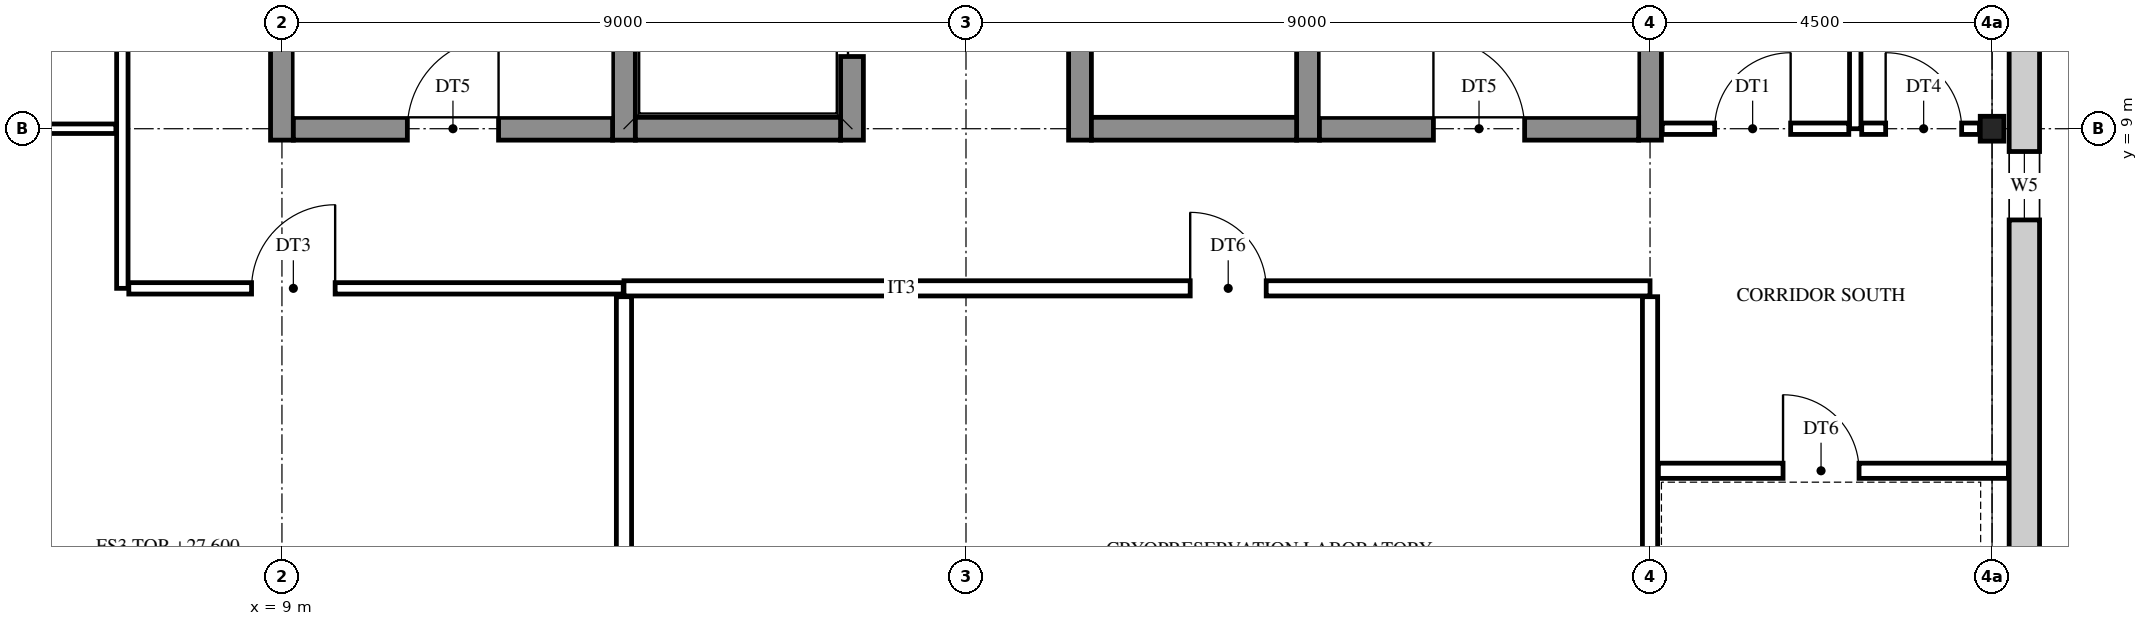
"""IFC4 building model, lengths in metres.
Left out: names, types, materials, properties, quantities, classifications, styles, units other than length and angle.
Written with IfcOpenShell. Run it as: python <this file> out.ifc"""

import sys

from ifc_helpers import new_model, si_unit, direction, frame, frame_2d, origin, origin_2d, place, context, subcontext, project, spatial, rectangle, i_section, extrude, element, fill, save


model = new_model("IFC4")
c1 = context("Model", 3, precision=1e-05, world=origin(), true_north=direction((0.0, 1.0)))
c2 = subcontext(c1, "Body", "Model", "MODEL_VIEW")
j1 = project(units=[si_unit("LENGTHUNIT", "METRE"), si_unit("PLANEANGLEUNIT", "RADIAN")], contexts=[c1])
p1 = place(None, origin())
s1 = spatial("IfcSite", under=j1, at=p1, CompositionType="ELEMENT")
p2 = place(p1, origin())
s2 = spatial("IfcBuilding", under=s1, at=p2, CompositionType="ELEMENT")
p3 = place(p2, frame((0.0, 0.0, 27.6)))
s3 = spatial("IfcBuildingStorey", under=s2, at=p3, CompositionType="ELEMENT", Elevation=27.6)
p4 = place(p3, frame((31.5, 9.0, 0.0), z_axis=(0.0, 0.0, 1.0), x_axis=(1.0, 0.0, 0.0)))
e1 = element("IfcColumn", 1, at=p4, inside=s3, PredefinedType="COLUMN", context=c2, shape_type="SweptSolid", body=[
    extrude(i_section(OverallWidth=0.311, OverallDepth=0.327, WebThickness=0.016, FlangeThickness=0.025, FilletRadius=0.017, at=origin_2d()), origin(), (0.0, 0.0, 1.0), 4.2),
])
for number, where, z_axis, x_axis in (
    (2, (9.0, 8.85, 0.0), (0.0, 0.0, 1.0), (0.0, 1.0, 0.0)),
    (3, (13.5, 8.85, 0.0), (0.0, 0.0, 1.0), (0.0, 1.0, 0.0)),
):
    element("IfcWall", number, at=place(p3, frame(where, z_axis=z_axis, x_axis=x_axis)), inside=s3, PredefinedType="SHEAR", context=c2, shape_type="SweptSolid", body=[
        extrude(rectangle(XDim=9.3, YDim=0.3, at=frame_2d((4.65, 0.0))), origin(), (0.0, 0.0, 1.0), 4.2),
    ])
p5 = place(p3, frame((16.5, 8.85, 0.0), z_axis=(0.0, 0.0, 1.0), x_axis=(0.0, 1.0, 0.0)))
e4 = element("IfcWall", 4, at=p5, inside=s3, PredefinedType="SHEAR", context=c2, shape_type="SweptSolid", body=[
    extrude(rectangle(XDim=9.3, YDim=0.3, at=frame_2d((4.65, 0.0))), origin(), (0.0, 0.0, 1.0), 4.2),
])
p6 = place(p5, frame((1.1, 0.0, 0.0)))
e5 = element("IfcOpeningElement", 5, at=p6, cuts=e4, PredefinedType="OPENING", context=c2, shape_type="SweptSolid", body=[
    extrude(rectangle(XDim=1.1, YDim=2.1, at=frame_2d((0.55, 1.05))), frame((0.0, 0.16, 0.0), z_axis=(0.0, -1.0, 0.0), x_axis=(1.0, 0.0, 0.0)), (0.0, 0.0, 1.0), 0.32),
])
p7 = place(p5, frame((4.1, 0.0, 0.0)))
e6 = element("IfcOpeningElement", 6, at=p7, cuts=e4, PredefinedType="OPENING", context=c2, shape_type="SweptSolid", body=[
    extrude(rectangle(XDim=1.1, YDim=2.1, at=frame_2d((0.55, 1.05))), frame((0.0, 0.16, 0.0), z_axis=(0.0, -1.0, 0.0), x_axis=(1.0, 0.0, 0.0)), (0.0, 0.0, 1.0), 0.32),
])
p8 = place(p3, frame((19.5, 8.85, 0.0), z_axis=(0.0, 0.0, 1.0), x_axis=(0.0, 1.0, 0.0)))
e7 = element("IfcWall", 7, at=p8, inside=s3, PredefinedType="SHEAR", context=c2, shape_type="SweptSolid", body=[
    extrude(rectangle(XDim=9.3, YDim=0.3, at=frame_2d((4.65, 0.0))), origin(), (0.0, 0.0, 1.0), 4.2),
])
p9 = place(p8, frame((3.95, 0.0, 0.0)))
e8 = element("IfcOpeningElement", 8, at=p9, cuts=e7, PredefinedType="OPENING", context=c2, shape_type="SweptSolid", body=[
    extrude(rectangle(XDim=1.4, YDim=2.1, at=frame_2d((0.7, 1.05))), frame((0.0, 0.16, 0.0), z_axis=(0.0, -1.0, 0.0), x_axis=(1.0, 0.0, 0.0)), (0.0, 0.0, 1.0), 0.32),
])
p10 = place(p8, frame((7.1, 0.0, 0.0)))
e9 = element("IfcOpeningElement", 9, at=p10, cuts=e7, PredefinedType="OPENING", context=c2, shape_type="SweptSolid", body=[
    extrude(rectangle(XDim=1.1, YDim=2.1, at=frame_2d((0.55, 1.05))), frame((0.0, 0.16, 0.0), z_axis=(0.0, -1.0, 0.0), x_axis=(1.0, 0.0, 0.0)), (0.0, 0.0, 1.0), 0.32),
])
for number, where, z_axis, x_axis in (
    (10, (22.5, 8.85, 0.0), (0.0, 0.0, 1.0), (0.0, 1.0, 0.0)),
    (11, (27.0, 8.85, 0.0), (0.0, 0.0, 1.0), (0.0, 1.0, 0.0)),
):
    element("IfcWall", number, at=place(p3, frame(where, z_axis=z_axis, x_axis=x_axis)), inside=s3, PredefinedType="SHEAR", context=c2, shape_type="SweptSolid", body=[
        extrude(rectangle(XDim=9.3, YDim=0.3, at=frame_2d((4.65, 0.0))), origin(), (0.0, 0.0, 1.0), 4.2),
    ])
p11 = place(p3, frame((9.15, 9.0, 0.0), z_axis=(0.0, 0.0, 1.0), x_axis=(1.0, 0.0, 0.0)))
e12 = element("IfcWall", 12, at=p11, inside=s3, PredefinedType="SHEAR", context=c2, shape_type="SweptSolid", body=[
    extrude(rectangle(XDim=4.2, YDim=0.3, at=frame_2d((2.1, 0.0))), origin(), (0.0, 0.0, 1.0), 4.2),
])
p12 = place(p11, frame((1.5, 0.0, 0.0)))
e13 = element("IfcOpeningElement", 13, at=p12, cuts=e12, PredefinedType="OPENING", context=c2, shape_type="SweptSolid", body=[
    extrude(rectangle(XDim=1.2, YDim=2.1, at=frame_2d((0.6, 1.05))), frame((0.0, 0.16, 0.0), z_axis=(0.0, -1.0, 0.0), x_axis=(1.0, 0.0, 0.0)), (0.0, 0.0, 1.0), 0.32),
])
for number, where, z_axis, x_axis in (
    (14, (13.65, 9.0, 0.0), (0.0, 0.0, 1.0), (1.0, 0.0, 0.0)),
    (15, (19.65, 9.0, 0.0), (0.0, 0.0, 1.0), (1.0, 0.0, 0.0)),
):
    element("IfcWall", number, at=place(p3, frame(where, z_axis=z_axis, x_axis=x_axis)), inside=s3, PredefinedType="SHEAR", context=c2, shape_type="SweptSolid", body=[
        extrude(rectangle(XDim=2.7, YDim=0.3, at=frame_2d((1.35, 0.0))), origin(), (0.0, 0.0, 1.0), 4.2),
    ])
p13 = place(p3, frame((22.65, 9.0, 0.0), z_axis=(0.0, 0.0, 1.0), x_axis=(1.0, 0.0, 0.0)))
e16 = element("IfcWall", 16, at=p13, inside=s3, PredefinedType="SHEAR", context=c2, shape_type="SweptSolid", body=[
    extrude(rectangle(XDim=4.2, YDim=0.3, at=frame_2d((2.1, 0.0))), origin(), (0.0, 0.0, 1.0), 4.2),
])
p14 = place(p13, frame((1.5, 0.0, 0.0)))
e17 = element("IfcOpeningElement", 17, at=p14, cuts=e16, PredefinedType="OPENING", context=c2, shape_type="SweptSolid", body=[
    extrude(rectangle(XDim=1.2, YDim=2.1, at=frame_2d((0.6, 1.05))), frame((0.0, 0.16, 0.0), z_axis=(0.0, -1.0, 0.0), x_axis=(1.0, 0.0, 0.0)), (0.0, 0.0, 1.0), 0.32),
])
p15 = place(p3, frame((31.925, 27.225, 0.0), z_axis=(0.0, 0.0, 1.0), x_axis=(0.0, -1.0, 0.0)))
e18 = element("IfcWall", 18, at=p15, inside=s3, PredefinedType="STANDARD", context=c2, shape_type="SweptSolid", body=[
    extrude(rectangle(XDim=27.45, YDim=0.4, at=frame_2d((13.725, 0.0))), origin(), (0.0, 0.0, 1.0), 4.2),
])
p16 = place(p15, frame((26.025, 0.0, 0.9)))
e19 = element("IfcOpeningElement", 19, at=p16, cuts=e18, PredefinedType="OPENING", context=c2, shape_type="SweptSolid", body=[
    extrude(rectangle(XDim=0.9, YDim=2.0, at=frame_2d((0.45, 1.0))), frame((0.0, 0.21, 0.0), z_axis=(0.0, -1.0, 0.0), x_axis=(1.0, 0.0, 0.0)), (0.0, 0.0, 1.0), 0.42),
])
p17 = place(p15, frame((18.525, 0.0, 0.9)))
e20 = element("IfcOpeningElement", 20, at=p17, cuts=e18, PredefinedType="OPENING", context=c2, shape_type="SweptSolid", body=[
    extrude(rectangle(XDim=0.9, YDim=2.0, at=frame_2d((0.45, 1.0))), frame((0.0, 0.21, 0.0), z_axis=(0.0, -1.0, 0.0), x_axis=(1.0, 0.0, 0.0)), (0.0, 0.0, 1.0), 0.42),
])
p18 = place(p15, frame((15.675, 0.0, 1.6)))
e21 = element("IfcOpeningElement", 21, at=p18, cuts=e18, PredefinedType="OPENING", context=c2, shape_type="SweptSolid", body=[
    extrude(rectangle(XDim=0.6, YDim=0.9, at=frame_2d((0.3, 0.45))), frame((0.0, 0.21, 0.0), z_axis=(0.0, -1.0, 0.0), x_axis=(1.0, 0.0, 0.0)), (0.0, 0.0, 1.0), 0.42),
])
p19 = place(p15, frame((11.175, 0.0, 1.6)))
e22 = element("IfcOpeningElement", 22, at=p19, cuts=e18, PredefinedType="OPENING", context=c2, shape_type="SweptSolid", body=[
    extrude(rectangle(XDim=0.6, YDim=0.9, at=frame_2d((0.3, 0.45))), frame((0.0, 0.21, 0.0), z_axis=(0.0, -1.0, 0.0), x_axis=(1.0, 0.0, 0.0)), (0.0, 0.0, 1.0), 0.42),
])
p20 = place(p15, frame((8.025, 0.0, 0.9)))
e23 = element("IfcOpeningElement", 23, at=p20, cuts=e18, PredefinedType="OPENING", context=c2, shape_type="SweptSolid", body=[
    extrude(rectangle(XDim=0.9, YDim=2.0, at=frame_2d((0.45, 1.0))), frame((0.0, 0.21, 0.0), z_axis=(0.0, -1.0, 0.0), x_axis=(1.0, 0.0, 0.0)), (0.0, 0.0, 1.0), 0.42),
])
p21 = place(p15, frame((0.525, 0.0, 0.9)))
e24 = element("IfcOpeningElement", 24, at=p21, cuts=e18, PredefinedType="OPENING", context=c2, shape_type="SweptSolid", body=[
    extrude(rectangle(XDim=0.9, YDim=2.0, at=frame_2d((0.45, 1.0))), frame((0.0, 0.21, 0.0), z_axis=(0.0, -1.0, 0.0), x_axis=(1.0, 0.0, 0.0)), (0.0, 0.0, 1.0), 0.42),
])
p22 = place(p3, frame((6.9, 6.9, 0.0), z_axis=(0.0, 0.0, 1.0), x_axis=(0.0, 1.0, 0.0)))
e25 = element("IfcWall", 25, at=p22, inside=s3, PredefinedType="PARTITIONING", context=c2, shape_type="SweptSolid", body=[
    extrude(rectangle(XDim=13.115, YDim=0.15, at=frame_2d((6.558, 0.0))), origin(), (0.0, 0.0, 1.0), 3.537),
])
p23 = place(p22, frame((11.6, 0.0, 0.0)))
e26 = element("IfcOpeningElement", 26, at=p23, cuts=e25, PredefinedType="OPENING", context=c2, shape_type="SweptSolid", body=[
    extrude(rectangle(XDim=1.1, YDim=2.1, at=frame_2d((0.55, 1.05))), frame((0.0, 0.085, 0.0), z_axis=(0.0, -1.0, 0.0), x_axis=(1.0, 0.0, 0.0)), (0.0, 0.0, 1.0), 0.17),
])
p24 = place(p22, frame((6.05, 0.0, 0.0)))
e27 = element("IfcOpeningElement", 27, at=p24, cuts=e25, PredefinedType="OPENING", context=c2, shape_type="SweptSolid", body=[
    extrude(rectangle(XDim=1.1, YDim=2.1, at=frame_2d((0.55, 1.05))), frame((0.0, 0.085, 0.0), z_axis=(0.0, -1.0, 0.0), x_axis=(1.0, 0.0, 0.0)), (0.0, 0.0, 1.0), 0.17),
])
p25 = place(p3, frame((13.5, -0.226, 0.0), z_axis=(0.0, 0.0, 1.0), x_axis=(0.0, 1.0, 0.0)))
e28 = element("IfcWall", 28, at=p25, inside=s3, PredefinedType="PARTITIONING", context=c2, shape_type="SweptSolid", body=[
    extrude(rectangle(XDim=7.016, YDim=0.2, at=frame_2d((3.508, 0.0))), origin(), (0.0, 0.0, 1.0), 3.537),
])
p26 = place(p3, frame((27.0, 0.174, 0.0), z_axis=(0.0, 0.0, 1.0), x_axis=(0.0, 1.0, 0.0)))
e29 = element("IfcWall", 29, at=p26, inside=s3, PredefinedType="PARTITIONING", context=c2, shape_type="SweptSolid", body=[
    extrude(rectangle(XDim=6.616, YDim=0.2, at=frame_2d((3.308, 0.0))), origin(), (0.0, 0.0, 1.0), 3.537),
])
p27 = place(p3, frame((29.7, 9.0, 0.0), z_axis=(0.0, 0.0, 1.0), x_axis=(0.0, 1.0, 0.0)))
e30 = element("IfcWall", 30, at=p27, inside=s3, PredefinedType="PARTITIONING", context=c2, shape_type="SweptSolid", body=[
    extrude(rectangle(XDim=6.3, YDim=0.15, at=frame_2d((3.15, 0.0))), origin(), (0.0, 0.0, 1.0), 3.537),
])
p28 = place(p27, frame((4.0, 0.0, 0.0)))
e31 = element("IfcOpeningElement", 31, at=p28, cuts=e30, PredefinedType="OPENING", context=c2, shape_type="SweptSolid", body=[
    extrude(rectangle(XDim=1.0, YDim=2.1, at=frame_2d((0.5, 1.05))), frame((0.0, 0.085, 0.0), z_axis=(0.0, -1.0, 0.0), x_axis=(1.0, 0.0, 0.0)), (0.0, 0.0, 1.0), 0.17),
])
p29 = place(p3, frame((27.11, 4.5, 0.0), z_axis=(0.0, 0.0, 1.0), x_axis=(1.0, 0.0, 0.0)))
e32 = element("IfcWall", 32, at=p29, inside=s3, PredefinedType="PARTITIONING", context=c2, shape_type="SweptSolid", body=[
    extrude(rectangle(XDim=4.605, YDim=0.2, at=frame_2d((2.302, 0.0))), origin(), (0.0, 0.0, 1.0), 3.537),
])
p30 = place(p29, frame((1.64, 0.0, 0.0)))
e33 = element("IfcOpeningElement", 33, at=p30, cuts=e32, PredefinedType="OPENING", context=c2, shape_type="SweptSolid", body=[
    extrude(rectangle(XDim=1.0, YDim=2.1, at=frame_2d((0.5, 1.05))), frame((0.0, 0.11, 0.0), z_axis=(0.0, -1.0, 0.0), x_axis=(1.0, 0.0, 0.0)), (0.0, 0.0, 1.0), 0.22),
])
p31 = place(p3, frame((6.985, 6.9, 0.0), z_axis=(0.0, 0.0, 1.0), x_axis=(1.0, 0.0, 0.0)))
e34 = element("IfcWall", 34, at=p31, inside=s3, PredefinedType="PARTITIONING", context=c2, shape_type="SweptSolid", body=[
    extrude(rectangle(XDim=6.505, YDim=0.15, at=frame_2d((3.252, 0.0))), origin(), (0.0, 0.0, 1.0), 3.537),
])
p32 = place(p31, frame((1.615, 0.0, 0.0)))
e35 = element("IfcOpeningElement", 35, at=p32, cuts=e34, PredefinedType="OPENING", context=c2, shape_type="SweptSolid", body=[
    extrude(rectangle(XDim=1.1, YDim=2.1, at=frame_2d((0.55, 1.05))), frame((0.0, 0.085, 0.0), z_axis=(0.0, -1.0, 0.0), x_axis=(1.0, 0.0, 0.0)), (0.0, 0.0, 1.0), 0.17),
])
p33 = place(p3, frame((13.5, 6.9, 0.0), z_axis=(0.0, 0.0, 1.0), x_axis=(1.0, 0.0, 0.0)))
e36 = element("IfcWall", 36, at=p33, inside=s3, PredefinedType="PARTITIONING", context=c2, shape_type="SweptSolid", body=[
    extrude(rectangle(XDim=13.5, YDim=0.2, at=frame_2d((6.75, 0.0))), origin(), (0.0, 0.0, 1.0), 3.537),
])
p34 = place(p33, frame((7.45, 0.0, 0.0)))
e37 = element("IfcOpeningElement", 37, at=p34, cuts=e36, PredefinedType="OPENING", context=c2, shape_type="SweptSolid", body=[
    extrude(rectangle(XDim=1.0, YDim=2.1, at=frame_2d((0.5, 1.05))), frame((0.0, 0.11, 0.0), z_axis=(0.0, -1.0, 0.0), x_axis=(1.0, 0.0, 0.0)), (0.0, 0.0, 1.0), 0.22),
])
p35 = place(p3, frame((0.166, 9.0, 0.0), z_axis=(0.0, 0.0, 1.0), x_axis=(1.0, 0.0, 0.0)))
e38 = element("IfcWall", 38, at=p35, inside=s3, PredefinedType="PARTITIONING", context=c2, shape_type="SweptSolid", body=[
    extrude(rectangle(XDim=6.649, YDim=0.125, at=frame_2d((3.325, 0.0))), origin(), (0.0, 0.0, 1.0), 3.537),
])
p36 = place(p3, frame((27.16, 9.0, 0.0), z_axis=(0.0, 0.0, 1.0), x_axis=(1.0, 0.0, 0.0)))
e39 = element("IfcWall", 39, at=p36, inside=s3, PredefinedType="PARTITIONING", context=c2, shape_type="SweptSolid", body=[
    extrude(rectangle(XDim=2.455, YDim=0.15, at=frame_2d((1.228, 0.0))), origin(), (0.0, 0.0, 1.0), 3.537),
])
p37 = place(p36, frame((0.69, 0.0, 0.0)))
e40 = element("IfcOpeningElement", 40, at=p37, cuts=e39, PredefinedType="OPENING", context=c2, shape_type="SweptSolid", body=[
    extrude(rectangle(XDim=1.0, YDim=2.1, at=frame_2d((0.5, 1.05))), frame((0.0, 0.085, 0.0), z_axis=(0.0, -1.0, 0.0), x_axis=(1.0, 0.0, 0.0)), (0.0, 0.0, 1.0), 0.17),
])
p38 = place(p3, frame((29.785, 9.0, 0.0), z_axis=(0.0, 0.0, 1.0), x_axis=(1.0, 0.0, 0.0)))
e41 = element("IfcWall", 41, at=p38, inside=s3, PredefinedType="PARTITIONING", context=c2, shape_type="SweptSolid", body=[
    extrude(rectangle(XDim=1.55, YDim=0.15, at=frame_2d((0.775, 0.0))), origin(), (0.0, 0.0, 1.0), 3.537),
])
p39 = place(p38, frame((0.315, 0.0, 0.0)))
e42 = element("IfcOpeningElement", 42, at=p39, cuts=e41, PredefinedType="OPENING", context=c2, shape_type="SweptSolid", body=[
    extrude(rectangle(XDim=1.0, YDim=2.1, at=frame_2d((0.5, 1.05))), frame((0.0, 0.085, 0.0), z_axis=(0.0, -1.0, 0.0), x_axis=(1.0, 0.0, 0.0)), (0.0, 0.0, 1.0), 0.17),
])
p40 = place(p17, origin())
e43 = element("IfcWindow", 43, at=p40, inside=s3, PartitioningType="SINGLE_PANEL", PredefinedType="WINDOW", context=c2, shape_type="SweptSolid", body=[
    extrude(rectangle(XDim=0.9, YDim=2.0, at=frame_2d((0.45, 1.0))), frame((0.0, 0.03, 0.0), z_axis=(0.0, -1.0, 0.0), x_axis=(1.0, 0.0, 0.0)), (0.0, 0.0, 1.0), 0.06),
])
fill(e20, e43)
p41 = place(p12, origin())
e44 = element("IfcDoor", 44, at=p41, inside=s3, OperationType="SINGLE_SWING_RIGHT", PredefinedType="DOOR", context=c2, shape_type="SweptSolid", body=[
    extrude(rectangle(XDim=1.2, YDim=2.1, at=frame_2d((0.6, 1.05))), frame((0.0, 0.025, 0.0), z_axis=(0.0, -1.0, 0.0), x_axis=(1.0, 0.0, 0.0)), (0.0, 0.0, 1.0), 0.05),
])
fill(e13, e44)
p42 = place(p14, origin())
e45 = element("IfcDoor", 45, at=p42, inside=s3, OperationType="SINGLE_SWING_LEFT", PredefinedType="DOOR", context=c2, shape_type="SweptSolid", body=[
    extrude(rectangle(XDim=1.2, YDim=2.1, at=frame_2d((0.6, 1.05))), frame((0.0, 0.025, 0.0), z_axis=(0.0, -1.0, 0.0), x_axis=(1.0, 0.0, 0.0)), (0.0, 0.0, 1.0), 0.05),
])
fill(e17, e45)
p43 = place(p37, origin())
e46 = element("IfcDoor", 46, at=p43, inside=s3, OperationType="SINGLE_SWING_RIGHT", PredefinedType="DOOR", context=c2, shape_type="SweptSolid", body=[
    extrude(rectangle(XDim=1.0, YDim=2.1, at=frame_2d((0.5, 1.05))), frame((0.0, 0.025, 0.0), z_axis=(0.0, -1.0, 0.0), x_axis=(1.0, 0.0, 0.0)), (0.0, 0.0, 1.0), 0.05),
])
fill(e40, e46)
p44 = place(p39, origin())
e47 = element("IfcDoor", 47, at=p44, inside=s3, OperationType="SINGLE_SWING_LEFT", PredefinedType="DOOR", context=c2, shape_type="SweptSolid", body=[
    extrude(rectangle(XDim=1.0, YDim=2.1, at=frame_2d((0.5, 1.05))), frame((0.0, 0.025, 0.0), z_axis=(0.0, -1.0, 0.0), x_axis=(1.0, 0.0, 0.0)), (0.0, 0.0, 1.0), 0.05),
])
fill(e42, e47)
p45 = place(p30, frame((1.0, 0.0, 0.0), z_axis=(0.0, 0.0, 1.0), x_axis=(-1.0, 0.0, 0.0)))
e48 = element("IfcDoor", 48, at=p45, inside=s3, OperationType="SINGLE_SWING_LEFT", PredefinedType="DOOR", context=c2, shape_type="SweptSolid", body=[
    extrude(rectangle(XDim=1.0, YDim=2.1, at=frame_2d((0.5, 1.05))), frame((0.0, 0.025, 0.0), z_axis=(0.0, -1.0, 0.0), x_axis=(1.0, 0.0, 0.0)), (0.0, 0.0, 1.0), 0.05),
])
fill(e33, e48)
p46 = place(p32, frame((1.1, 0.0, 0.0), z_axis=(0.0, 0.0, 1.0), x_axis=(-1.0, 0.0, 0.0)))
e49 = element("IfcDoor", 49, at=p46, inside=s3, OperationType="SINGLE_SWING_RIGHT", PredefinedType="DOOR", context=c2, shape_type="SweptSolid", body=[
    extrude(rectangle(XDim=1.1, YDim=2.1, at=frame_2d((0.55, 1.05))), frame((0.0, 0.025, 0.0), z_axis=(0.0, -1.0, 0.0), x_axis=(1.0, 0.0, 0.0)), (0.0, 0.0, 1.0), 0.05),
])
fill(e35, e49)
p47 = place(p34, frame((1.0, 0.0, 0.0), z_axis=(0.0, 0.0, 1.0), x_axis=(-1.0, 0.0, 0.0)))
e50 = element("IfcDoor", 50, at=p47, inside=s3, OperationType="SINGLE_SWING_LEFT", PredefinedType="DOOR", context=c2, shape_type="SweptSolid", body=[
    extrude(rectangle(XDim=1.0, YDim=2.1, at=frame_2d((0.5, 1.05))), frame((0.0, 0.025, 0.0), z_axis=(0.0, -1.0, 0.0), x_axis=(1.0, 0.0, 0.0)), (0.0, 0.0, 1.0), 0.05),
])
fill(e37, e50)
p48 = place(p6, origin())
e51 = element("IfcDoor", 51, at=p48, inside=s3, OperationType="DOUBLE_DOOR_SLIDING", PredefinedType="DOOR", context=c2, shape_type="SweptSolid", body=[
    extrude(rectangle(XDim=1.1, YDim=2.1, at=frame_2d((0.55, 1.05))), frame((0.0, 0.025, 0.0), z_axis=(0.0, -1.0, 0.0), x_axis=(1.0, 0.0, 0.0)), (0.0, 0.0, 1.0), 0.05),
])
fill(e5, e51)
save(model, sys.argv[1])
